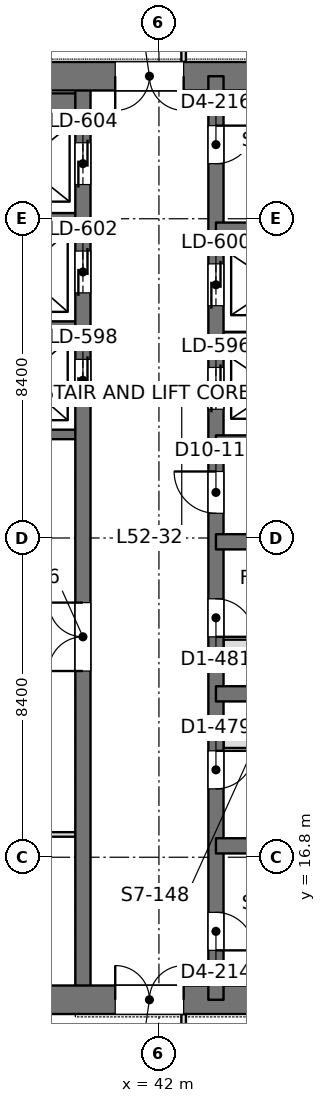
"""IFC4 building model, lengths in metres.
Left out: names, types, materials, properties, quantities, classifications, styles, units other than length and angle.
Written with IfcOpenShell. Run it as: python <this file> out.ifc"""

import sys

from ifc_helpers import new_model, si_unit, direction, frame, frame_2d, origin, place, context, subcontext, project, spatial, rectangle, extrude, element, fill, save


model = new_model("IFC4")
c1 = context("Model", 3, precision=1e-05, world=origin(), true_north=direction((0.0, 1.0)))
c2 = subcontext(c1, "Body", "Model", "MODEL_VIEW")
j1 = project(units=[si_unit("LENGTHUNIT", "METRE"), si_unit("PLANEANGLEUNIT", "RADIAN")], contexts=[c1])
p1 = place(None, origin())
s1 = spatial("IfcSite", under=j1, at=p1, CompositionType="ELEMENT")
p2 = place(p1, origin())
s2 = spatial("IfcBuilding", under=s1, at=p2, CompositionType="ELEMENT")
p3 = place(p2, frame((0.0, 0.0, 228.0)))
s3 = spatial("IfcBuildingStorey", under=s2, at=p3, CompositionType="ELEMENT", Elevation=228.0)
p4 = place(p3, frame((33.675, 13.05, 0.0), z_axis=(0.0, 0.0, 1.0), x_axis=(1.0, 0.0, 0.0)))
e1 = element("IfcWall", 1, at=p4, inside=s3, PredefinedType="SHEAR", context=c2, shape_type="SweptSolid", body=[
    extrude(rectangle(XDim=17.85, YDim=0.75, at=frame_2d((8.925, 0.0))), origin(), (0.0, 0.0, 1.0), 4.2),
])
p5 = place(p4, frame((7.175, 0.0, 0.0)))
e2 = element("IfcOpeningElement", 2, at=p5, cuts=e1, PredefinedType="OPENING", context=c2, shape_type="SweptSolid", body=[
    extrude(rectangle(XDim=1.8, YDim=2.4, at=frame_2d((0.9, 1.2))), frame((0.0, 0.385, 0.0), z_axis=(0.0, -1.0, 0.0), x_axis=(1.0, 0.0, 0.0)), (0.0, 0.0, 1.0), 0.77),
])
p6 = place(p3, frame((33.675, 37.35, 0.0), z_axis=(0.0, 0.0, 1.0), x_axis=(1.0, 0.0, 0.0)))
e3 = element("IfcWall", 3, at=p6, inside=s3, PredefinedType="SHEAR", context=c2, shape_type="SweptSolid", body=[
    extrude(rectangle(XDim=17.85, YDim=0.75, at=frame_2d((8.925, 0.0))), origin(), (0.0, 0.0, 1.0), 4.2),
])
p7 = place(p6, frame((7.175, 0.0, 0.0)))
e4 = element("IfcOpeningElement", 4, at=p7, cuts=e3, PredefinedType="OPENING", context=c2, shape_type="SweptSolid", body=[
    extrude(rectangle(XDim=1.8, YDim=2.4, at=frame_2d((0.9, 1.2))), frame((0.0, 0.385, 0.0), z_axis=(0.0, -1.0, 0.0), x_axis=(1.0, 0.0, 0.0)), (0.0, 0.0, 1.0), 0.77),
])
p8 = place(p3, frame((43.5, 13.05, 0.0), z_axis=(0.0, 0.0, 1.0), x_axis=(0.0, 1.0, 0.0)))
e5 = element("IfcWall", 5, at=p8, inside=s3, PredefinedType="SHEAR", context=c2, shape_type="SweptSolid", body=[
    extrude(rectangle(XDim=24.3, YDim=0.4, at=frame_2d((12.15, 0.0))), origin(), (0.0, 0.0, 1.0), 4.2),
])
p9 = place(p8, frame((1.3, 0.0, 0.0)))
e6 = element("IfcOpeningElement", 6, at=p9, cuts=e5, PredefinedType="OPENING", context=c2, shape_type="SweptSolid", body=[
    extrude(rectangle(XDim=1.0, YDim=2.2, at=frame_2d((0.5, 1.1))), frame((0.0, 0.21, 0.0), z_axis=(0.0, -1.0, 0.0), x_axis=(1.0, 0.0, 0.0)), (0.0, 0.0, 1.0), 0.42),
])
p10 = place(p8, frame((22.0, 0.0, 0.0)))
e7 = element("IfcOpeningElement", 7, at=p10, cuts=e5, PredefinedType="OPENING", context=c2, shape_type="SweptSolid", body=[
    extrude(rectangle(XDim=1.0, YDim=2.2, at=frame_2d((0.5, 1.1))), frame((0.0, 0.21, 0.0), z_axis=(0.0, -1.0, 0.0), x_axis=(1.0, 0.0, 0.0)), (0.0, 0.0, 1.0), 0.42),
])
p11 = place(p8, frame((5.55, 0.0, 0.0)))
e8 = element("IfcOpeningElement", 8, at=p11, cuts=e5, PredefinedType="OPENING", context=c2, shape_type="SweptSolid", body=[
    extrude(rectangle(XDim=1.0, YDim=2.2, at=frame_2d((0.5, 1.1))), frame((0.0, 0.21, 0.0), z_axis=(0.0, -1.0, 0.0), x_axis=(1.0, 0.0, 0.0)), (0.0, 0.0, 1.0), 0.42),
])
p12 = place(p8, frame((9.55, 0.0, 0.0)))
e9 = element("IfcOpeningElement", 9, at=p12, cuts=e5, PredefinedType="OPENING", context=c2, shape_type="SweptSolid", body=[
    extrude(rectangle(XDim=1.0, YDim=2.2, at=frame_2d((0.5, 1.1))), frame((0.0, 0.21, 0.0), z_axis=(0.0, -1.0, 0.0), x_axis=(1.0, 0.0, 0.0)), (0.0, 0.0, 1.0), 0.42),
])
p13 = place(p8, frame((12.8, 0.0, 0.0)))
e10 = element("IfcOpeningElement", 10, at=p13, cuts=e5, PredefinedType="OPENING", context=c2, shape_type="SweptSolid", body=[
    extrude(rectangle(XDim=1.1, YDim=2.2, at=frame_2d((0.55, 1.1))), frame((0.0, 0.21, 0.0), z_axis=(0.0, -1.0, 0.0), x_axis=(1.0, 0.0, 0.0)), (0.0, 0.0, 1.0), 0.42),
])
p14 = place(p8, frame((15.538, 0.0, 0.0)))
e11 = element("IfcOpeningElement", 11, at=p14, cuts=e5, PredefinedType="OPENING", context=c2, shape_type="SweptSolid", body=[
    extrude(rectangle(XDim=1.1, YDim=2.2, at=frame_2d((0.55, 1.1))), frame((0.0, 0.21, 0.0), z_axis=(0.0, -1.0, 0.0), x_axis=(1.0, 0.0, 0.0)), (0.0, 0.0, 1.0), 0.42),
])
p15 = place(p8, frame((18.262, 0.0, 0.0)))
e12 = element("IfcOpeningElement", 12, at=p15, cuts=e5, PredefinedType="OPENING", context=c2, shape_type="SweptSolid", body=[
    extrude(rectangle(XDim=1.1, YDim=2.2, at=frame_2d((0.55, 1.1))), frame((0.0, 0.21, 0.0), z_axis=(0.0, -1.0, 0.0), x_axis=(1.0, 0.0, 0.0)), (0.0, 0.0, 1.0), 0.42),
])
p16 = place(p3, frame((40.0, 13.05, 0.0), z_axis=(0.0, 0.0, 1.0), x_axis=(0.0, 1.0, 0.0)))
e13 = element("IfcWall", 13, at=p16, inside=s3, PredefinedType="SHEAR", context=c2, shape_type="SweptSolid", body=[
    extrude(rectangle(XDim=24.3, YDim=0.4, at=frame_2d((12.15, 0.0))), origin(), (0.0, 0.0, 1.0), 4.2),
])
p17 = place(p16, frame((15.75, 0.0, 0.0)))
e14 = element("IfcOpeningElement", 14, at=p17, cuts=e13, PredefinedType="OPENING", context=c2, shape_type="SweptSolid", body=[
    extrude(rectangle(XDim=1.1, YDim=2.2, at=frame_2d((0.55, 1.1))), frame((0.0, 0.21, 0.0), z_axis=(0.0, -1.0, 0.0), x_axis=(1.0, 0.0, 0.0)), (0.0, 0.0, 1.0), 0.42),
])
p18 = place(p16, frame((18.6, 0.0, 0.0)))
e15 = element("IfcOpeningElement", 15, at=p18, cuts=e13, PredefinedType="OPENING", context=c2, shape_type="SweptSolid", body=[
    extrude(rectangle(XDim=1.1, YDim=2.2, at=frame_2d((0.55, 1.1))), frame((0.0, 0.21, 0.0), z_axis=(0.0, -1.0, 0.0), x_axis=(1.0, 0.0, 0.0)), (0.0, 0.0, 1.0), 0.42),
])
p19 = place(p16, frame((21.45, 0.0, 0.0)))
e16 = element("IfcOpeningElement", 16, at=p19, cuts=e13, PredefinedType="OPENING", context=c2, shape_type="SweptSolid", body=[
    extrude(rectangle(XDim=1.1, YDim=2.2, at=frame_2d((0.55, 1.1))), frame((0.0, 0.21, 0.0), z_axis=(0.0, -1.0, 0.0), x_axis=(1.0, 0.0, 0.0)), (0.0, 0.0, 1.0), 0.42),
])
p20 = place(p16, frame((8.65, 0.0, 0.0)))
e17 = element("IfcOpeningElement", 17, at=p20, cuts=e13, PredefinedType="OPENING", context=c2, shape_type="SweptSolid", body=[
    extrude(rectangle(XDim=1.8, YDim=2.4, at=frame_2d((0.9, 1.2))), frame((0.0, 0.21, 0.0), z_axis=(0.0, -1.0, 0.0), x_axis=(1.0, 0.0, 0.0)), (0.0, 0.0, 1.0), 0.42),
])
for number, where, z_axis, x_axis in (
    (18, (51.15, 17.1, 0.0), (0.0, 0.0, 1.0), (-1.0, 0.0, 0.0)),
    (19, (51.15, 21.1, 0.0), (0.0, 0.0, 1.0), (-1.0, 0.0, 0.0)),
    (20, (51.15, 25.1, 0.0), (0.0, 0.0, 1.0), (-1.0, 0.0, 0.0)),
    (21, (51.15, 27.7, 0.0), (0.0, 0.0, 1.0), (-1.0, 0.0, 0.0)),
    (22, (51.15, 33.3, 0.0), (0.0, 0.0, 1.0), (-1.0, 0.0, 0.0)),
):
    element("IfcWall", number, at=place(p3, frame(where, z_axis=z_axis, x_axis=x_axis)), inside=s3, PredefinedType="SHEAR", context=c2, shape_type="SweptSolid", body=[
        extrude(rectangle(XDim=7.65, YDim=0.4, at=frame_2d((3.825, 0.0))), origin(), (0.0, 0.0, 1.0), 4.2),
    ])
p21 = place(p3, frame((46.7, 30.5, 0.0), z_axis=(0.0, 0.0, 1.0), x_axis=(-1.0, 0.0, 0.0)))
e23 = element("IfcWall", 23, at=p21, inside=s3, PredefinedType="SHEAR", context=c2, shape_type="SweptSolid", body=[
    extrude(rectangle(XDim=3.2, YDim=0.25, at=frame_2d((1.6, 0.0))), origin(), (0.0, 0.0, 1.0), 4.2),
])
p22 = place(p3, frame((40.0, 27.925, 0.0), z_axis=(0.0, 0.0, 1.0), x_axis=(-1.0, 0.0, 0.0)))
e24 = element("IfcWall", 24, at=p22, inside=s3, PredefinedType="SHEAR", context=c2, shape_type="SweptSolid", body=[
    extrude(rectangle(XDim=5.95, YDim=0.25, at=frame_2d((2.975, 0.0))), origin(), (0.0, 0.0, 1.0), 4.2),
])
for number, where, z_axis, x_axis in (
    (25, (40.0, 30.775, 0.0), (0.0, 0.0, 1.0), (-1.0, 0.0, 0.0)),
    (26, (40.0, 33.625, 0.0), (0.0, 0.0, 1.0), (-1.0, 0.0, 0.0)),
):
    element("IfcWall", number, at=place(p3, frame(where, z_axis=z_axis, x_axis=x_axis)), inside=s3, PredefinedType="SHEAR", context=c2, shape_type="SweptSolid", body=[
        extrude(rectangle(XDim=3.2, YDim=0.25, at=frame_2d((1.6, 0.0))), origin(), (0.0, 0.0, 1.0), 4.2),
    ])
p23 = place(p3, frame((40.0, 36.625, 0.0), z_axis=(0.0, 0.0, 1.0), x_axis=(-1.0, 0.0, 0.0)))
e27 = element("IfcWall", 27, at=p23, inside=s3, PredefinedType="SHEAR", context=c2, shape_type="SweptSolid", body=[
    extrude(rectangle(XDim=3.2, YDim=0.55, at=frame_2d((1.6, 0.0))), origin(), (0.0, 0.0, 1.0), 4.2),
])
p24 = place(p3, frame((33.898, 17.4, 0.0), z_axis=(0.0, 0.0, 1.0), x_axis=(1.0, 0.0, 0.0)))
e28 = element("IfcWall", 28, at=p24, inside=s3, PredefinedType="PARTITIONING", context=c2, shape_type="SweptSolid", body=[
    extrude(rectangle(XDim=5.904, YDim=0.12, at=frame_2d((2.952, 0.0))), origin(), (0.0, 0.0, 1.0), 3.55),
])
p25 = place(p3, frame((42.65, 10.758, 0.0), z_axis=(0.0, 0.0, 1.0), x_axis=(0.0, 1.0, 0.0)))
e29 = element("IfcWall", 29, at=p25, inside=s3, PredefinedType="PARTITIONING", context=c2, shape_type="SweptSolid", body=[
    extrude(rectangle(XDim=1.918, YDim=0.12, at=frame_2d((0.959, 0.0))), origin(), (0.0, 0.0, 1.0), 4.05),
])
p26 = place(p25, frame((0.392, 0.0, 0.0)))
e30 = element("IfcOpeningElement", 30, at=p26, cuts=e29, PredefinedType="OPENING", context=c2, shape_type="SweptSolid", body=[
    extrude(rectangle(XDim=1.0, YDim=2.4, at=frame_2d((0.5, 1.2))), frame((0.0, 0.07, 0.0), z_axis=(0.0, -1.0, 0.0), x_axis=(1.0, 0.0, 0.0)), (0.0, 0.0, 1.0), 0.14),
])
p27 = place(p3, frame((42.65, 37.724, 0.0), z_axis=(0.0, 0.0, 1.0), x_axis=(0.0, 1.0, 0.0)))
e31 = element("IfcWall", 31, at=p27, inside=s3, PredefinedType="PARTITIONING", context=c2, shape_type="SweptSolid", body=[
    extrude(rectangle(XDim=1.918, YDim=0.12, at=frame_2d((0.959, 0.0))), origin(), (0.0, 0.0, 1.0), 4.05),
])
p28 = place(p27, frame((0.526, 0.0, 0.0)))
e32 = element("IfcOpeningElement", 32, at=p28, cuts=e31, PredefinedType="OPENING", context=c2, shape_type="SweptSolid", body=[
    extrude(rectangle(XDim=1.0, YDim=2.4, at=frame_2d((0.5, 1.2))), frame((0.0, 0.07, 0.0), z_axis=(0.0, -1.0, 0.0), x_axis=(1.0, 0.0, 0.0)), (0.0, 0.0, 1.0), 0.14),
])
p29 = place(p3, frame((43.7, 22.4, 0.0), z_axis=(0.0, 0.0, 1.0), x_axis=(1.0, 0.0, 0.0)))
e33 = element("IfcWall", 33, at=p29, inside=s3, PredefinedType="PARTITIONING", context=c2, shape_type="SweptSolid", body=[
    extrude(rectangle(XDim=6.675, YDim=0.25, at=frame_2d((3.337, 0.0))), origin(), (0.0, 0.0, 1.0), 4.0),
])
p30 = place(p29, frame((2.863, 0.0, 0.0)))
e34 = element("IfcOpeningElement", 34, at=p30, cuts=e33, PredefinedType="OPENING", context=c2, shape_type="SweptSolid", body=[
    extrude(rectangle(XDim=0.9, YDim=2.2, at=frame_2d((0.45, 1.1))), frame((0.0, 0.135, 0.0), z_axis=(0.0, -1.0, 0.0), x_axis=(1.0, 0.0, 0.0)), (0.0, 0.0, 1.0), 0.27),
])
p31 = place(p3, frame((43.7, 19.8, 0.0), z_axis=(0.0, 0.0, 1.0), x_axis=(1.0, 0.0, 0.0)))
e35 = element("IfcWall", 35, at=p31, inside=s3, PredefinedType="PARTITIONING", context=c2, shape_type="SweptSolid", body=[
    extrude(rectangle(XDim=6.675, YDim=0.25, at=frame_2d((3.337, 0.0))), origin(), (0.0, 0.0, 1.0), 4.0),
])
p32 = place(p31, frame((2.863, 0.0, 0.0)))
e36 = element("IfcOpeningElement", 36, at=p32, cuts=e35, PredefinedType="OPENING", context=c2, shape_type="SweptSolid", body=[
    extrude(rectangle(XDim=0.9, YDim=2.2, at=frame_2d((0.45, 1.1))), frame((0.0, 0.135, 0.0), z_axis=(0.0, -1.0, 0.0), x_axis=(1.0, 0.0, 0.0)), (0.0, 0.0, 1.0), 0.27),
])
p33 = place(p5, origin())
e37 = element("IfcDoor", 37, at=p33, inside=s3, OperationType="DOUBLE_DOOR_SINGLE_SWING", PredefinedType="DOOR", context=c2, shape_type="SweptSolid", body=[
    extrude(rectangle(XDim=1.8, YDim=2.4, at=frame_2d((0.9, 1.2))), frame((0.0, 0.025, 0.0), z_axis=(0.0, -1.0, 0.0), x_axis=(1.0, 0.0, 0.0)), (0.0, 0.0, 1.0), 0.05),
])
fill(e2, e37)
p34 = place(p7, frame((1.8, 0.0, 0.0), z_axis=(0.0, 0.0, 1.0), x_axis=(-1.0, 0.0, 0.0)))
e38 = element("IfcDoor", 38, at=p34, inside=s3, OperationType="DOUBLE_DOOR_SINGLE_SWING", PredefinedType="DOOR", context=c2, shape_type="SweptSolid", body=[
    extrude(rectangle(XDim=1.8, YDim=2.4, at=frame_2d((0.9, 1.2))), frame((0.0, 0.025, 0.0), z_axis=(0.0, -1.0, 0.0), x_axis=(1.0, 0.0, 0.0)), (0.0, 0.0, 1.0), 0.05),
])
fill(e4, e38)
p35 = place(p9, frame((1.0, 0.0, 0.0), z_axis=(0.0, 0.0, 1.0), x_axis=(-1.0, 0.0, 0.0)))
e39 = element("IfcDoor", 39, at=p35, inside=s3, OperationType="SINGLE_SWING_RIGHT", PredefinedType="DOOR", context=c2, shape_type="SweptSolid", body=[
    extrude(rectangle(XDim=1.0, YDim=2.2, at=frame_2d((0.5, 1.1))), frame((0.0, 0.025, 0.0), z_axis=(0.0, -1.0, 0.0), x_axis=(1.0, 0.0, 0.0)), (0.0, 0.0, 1.0), 0.05),
])
fill(e6, e39)
p36 = place(p10, frame((1.0, 0.0, 0.0), z_axis=(0.0, 0.0, 1.0), x_axis=(-1.0, 0.0, 0.0)))
e40 = element("IfcDoor", 40, at=p36, inside=s3, OperationType="SINGLE_SWING_LEFT", PredefinedType="DOOR", context=c2, shape_type="SweptSolid", body=[
    extrude(rectangle(XDim=1.0, YDim=2.2, at=frame_2d((0.5, 1.1))), frame((0.0, 0.025, 0.0), z_axis=(0.0, -1.0, 0.0), x_axis=(1.0, 0.0, 0.0)), (0.0, 0.0, 1.0), 0.05),
])
fill(e7, e40)
p37 = place(p11, frame((1.0, 0.0, 0.0), z_axis=(0.0, 0.0, 1.0), x_axis=(-1.0, 0.0, 0.0)))
e41 = element("IfcDoor", 41, at=p37, inside=s3, OperationType="SINGLE_SWING_LEFT", PredefinedType="DOOR", context=c2, shape_type="SweptSolid", body=[
    extrude(rectangle(XDim=1.0, YDim=2.2, at=frame_2d((0.5, 1.1))), frame((0.0, 0.025, 0.0), z_axis=(0.0, -1.0, 0.0), x_axis=(1.0, 0.0, 0.0)), (0.0, 0.0, 1.0), 0.05),
])
fill(e8, e41)
p38 = place(p12, frame((1.0, 0.0, 0.0), z_axis=(0.0, 0.0, 1.0), x_axis=(-1.0, 0.0, 0.0)))
e42 = element("IfcDoor", 42, at=p38, inside=s3, OperationType="SINGLE_SWING_RIGHT", PredefinedType="DOOR", context=c2, shape_type="SweptSolid", body=[
    extrude(rectangle(XDim=1.0, YDim=2.2, at=frame_2d((0.5, 1.1))), frame((0.0, 0.025, 0.0), z_axis=(0.0, -1.0, 0.0), x_axis=(1.0, 0.0, 0.0)), (0.0, 0.0, 1.0), 0.05),
])
fill(e9, e42)
p39 = place(p13, origin())
e43 = element("IfcDoor", 43, at=p39, inside=s3, OperationType="SINGLE_SWING_RIGHT", PredefinedType="DOOR", context=c2, shape_type="SweptSolid", body=[
    extrude(rectangle(XDim=1.1, YDim=2.2, at=frame_2d((0.55, 1.1))), frame((0.0, 0.025, 0.0), z_axis=(0.0, -1.0, 0.0), x_axis=(1.0, 0.0, 0.0)), (0.0, 0.0, 1.0), 0.05),
])
fill(e10, e43)
p40 = place(p17, origin())
e44 = element("IfcDoor", 44, at=p40, inside=s3, OperationType="DOUBLE_DOOR_SLIDING", PredefinedType="DOOR", context=c2, shape_type="SweptSolid", body=[
    extrude(rectangle(XDim=1.1, YDim=2.2, at=frame_2d((0.55, 1.1))), frame((0.0, 0.025, 0.0), z_axis=(0.0, -1.0, 0.0), x_axis=(1.0, 0.0, 0.0)), (0.0, 0.0, 1.0), 0.05),
])
fill(e14, e44)
p41 = place(p18, origin())
e45 = element("IfcDoor", 45, at=p41, inside=s3, OperationType="DOUBLE_DOOR_SLIDING", PredefinedType="DOOR", context=c2, shape_type="SweptSolid", body=[
    extrude(rectangle(XDim=1.1, YDim=2.2, at=frame_2d((0.55, 1.1))), frame((0.0, 0.025, 0.0), z_axis=(0.0, -1.0, 0.0), x_axis=(1.0, 0.0, 0.0)), (0.0, 0.0, 1.0), 0.05),
])
fill(e15, e45)
p42 = place(p19, origin())
e46 = element("IfcDoor", 46, at=p42, inside=s3, OperationType="DOUBLE_DOOR_SLIDING", PredefinedType="DOOR", context=c2, shape_type="SweptSolid", body=[
    extrude(rectangle(XDim=1.1, YDim=2.2, at=frame_2d((0.55, 1.1))), frame((0.0, 0.025, 0.0), z_axis=(0.0, -1.0, 0.0), x_axis=(1.0, 0.0, 0.0)), (0.0, 0.0, 1.0), 0.05),
])
fill(e16, e46)
p43 = place(p14, origin())
e47 = element("IfcDoor", 47, at=p43, inside=s3, OperationType="DOUBLE_DOOR_SLIDING", PredefinedType="DOOR", context=c2, shape_type="SweptSolid", body=[
    extrude(rectangle(XDim=1.1, YDim=2.2, at=frame_2d((0.55, 1.1))), frame((0.0, 0.025, 0.0), z_axis=(0.0, -1.0, 0.0), x_axis=(1.0, 0.0, 0.0)), (0.0, 0.0, 1.0), 0.05),
])
fill(e11, e47)
p44 = place(p15, origin())
e48 = element("IfcDoor", 48, at=p44, inside=s3, OperationType="DOUBLE_DOOR_SLIDING", PredefinedType="DOOR", context=c2, shape_type="SweptSolid", body=[
    extrude(rectangle(XDim=1.1, YDim=2.2, at=frame_2d((0.55, 1.1))), frame((0.0, 0.025, 0.0), z_axis=(0.0, -1.0, 0.0), x_axis=(1.0, 0.0, 0.0)), (0.0, 0.0, 1.0), 0.05),
])
fill(e12, e48)
p45 = place(p20, origin())
e49 = element("IfcDoor", 49, at=p45, inside=s3, OperationType="DOUBLE_DOOR_SINGLE_SWING", PredefinedType="DOOR", context=c2, shape_type="SweptSolid", body=[
    extrude(rectangle(XDim=1.8, YDim=2.4, at=frame_2d((0.9, 1.2))), frame((0.0, 0.025, 0.0), z_axis=(0.0, -1.0, 0.0), x_axis=(1.0, 0.0, 0.0)), (0.0, 0.0, 1.0), 0.05),
])
fill(e17, e49)
save(model, sys.argv[1])
